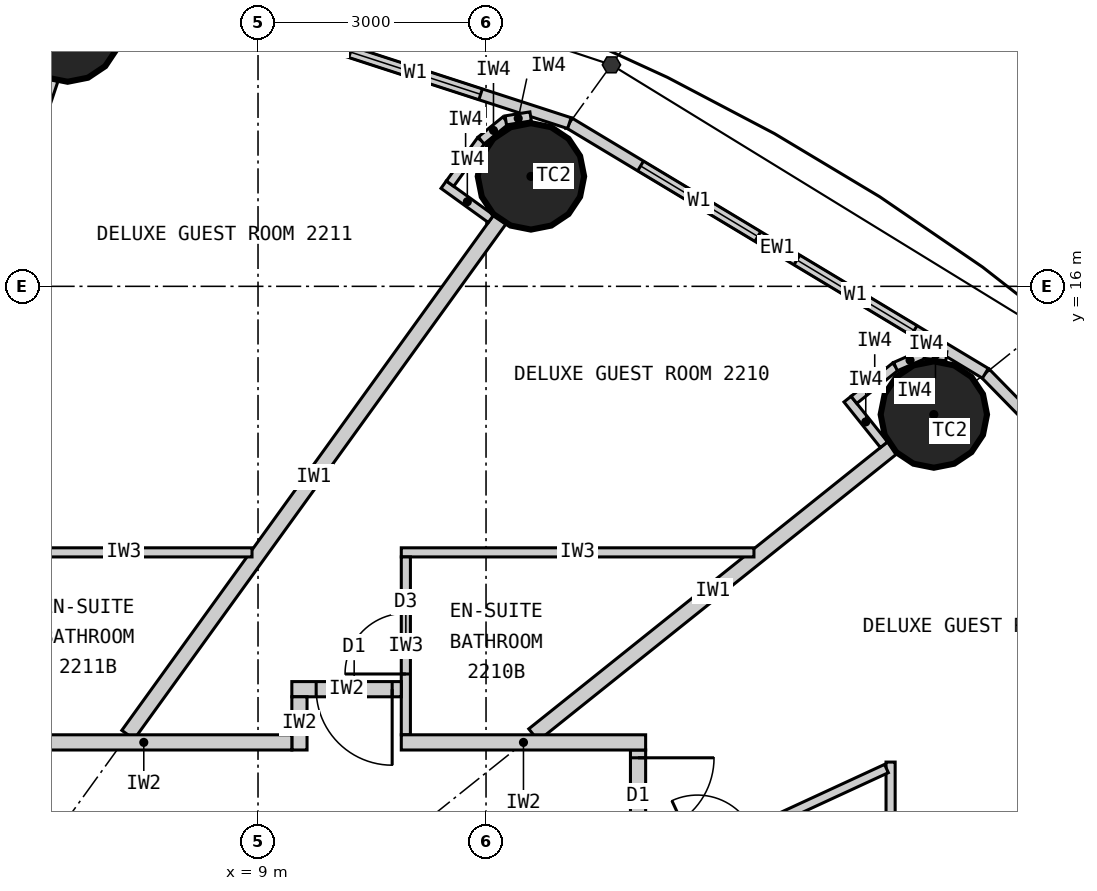
"""IFC4 building model, lengths in metres.
Left out: names, types, materials, properties, quantities, classifications, styles, units other than length and angle.
Written with IfcOpenShell. Run it as: python <this file> out.ifc"""

import sys

from ifc_helpers import new_model, si_unit, direction, frame, frame_2d, origin, origin_2d, place, context, subcontext, project, spatial, rectangle, circle, extrude, element, fill, save


model = new_model("IFC4")
c1 = context("Model", 3, precision=1e-05, world=origin(), true_north=direction((0.0, 1.0)))
c2 = subcontext(c1, "Body", "Model", "MODEL_VIEW")
j1 = project(units=[si_unit("LENGTHUNIT", "METRE"), si_unit("PLANEANGLEUNIT", "RADIAN")], contexts=[c1])
p1 = place(None, origin())
s1 = spatial("IfcSite", under=j1, at=p1, CompositionType="ELEMENT")
p2 = place(p1, origin())
s2 = spatial("IfcBuilding", under=s1, at=p2, CompositionType="ELEMENT")
p3 = place(p2, frame((0.0, 0.0, 87.0)))
s3 = spatial("IfcBuildingStorey", under=s2, at=p3, CompositionType="ELEMENT", Elevation=87.0)
for number, where, z_axis, x_axis in (
    (1, (17.892, 14.313, 0.0), (0.0, 0.0, 1.0), (1.0, 0.0, 0.0)),
    (2, (12.591, 17.447, 0.0), (0.0, 0.0, 1.0), (1.0, 0.0, 0.0)),
    (3, (6.495, 19.391, 0.0), (0.0, 0.0, 1.0), (1.0, 0.0, 0.0)),
):
    element("IfcColumn", number, at=place(p3, frame(where, z_axis=z_axis, x_axis=x_axis)), inside=s3, PredefinedType="COLUMN", context=c2, shape_type="SweptSolid", body=[
        extrude(circle(Radius=0.7, at=origin_2d()), origin(), (0.0, 0.0, 1.0), 3.3),
    ])
p4 = place(p3, frame((22.803, 10.532, 0.0), z_axis=(0.0, 0.0, 1.0), x_axis=(-0.699602905915, 0.714531856557, 0.0)))
e4 = element("IfcWall", 4, at=p4, inside=s3, PredefinedType="ELEMENTEDWALL", context=c2, shape_type="SweptSolid", body=[
    extrude(rectangle(XDim=6.051, YDim=0.15, at=frame_2d((3.025, 0.0))), origin(), (0.0, 0.0, 1.0), 3.12),
])
p5 = place(p4, frame((0.926, 0.0, 0.9)))
e5 = element("IfcOpeningElement", 5, at=p5, cuts=e4, PredefinedType="OPENING", context=c2, shape_type="SweptSolid", body=[
    extrude(rectangle(XDim=1.8, YDim=1.9, at=frame_2d((0.9, 0.95))), frame((0.0, 0.085, 0.0), z_axis=(0.0, -1.0, 0.0), x_axis=(1.0, 0.0, 0.0)), (0.0, 0.0, 1.0), 0.17),
])
p6 = place(p4, frame((3.325, 0.0, 0.9)))
e6 = element("IfcOpeningElement", 6, at=p6, cuts=e4, PredefinedType="OPENING", context=c2, shape_type="SweptSolid", body=[
    extrude(rectangle(XDim=1.8, YDim=1.9, at=frame_2d((0.9, 0.95))), frame((0.0, 0.085, 0.0), z_axis=(0.0, -1.0, 0.0), x_axis=(1.0, 0.0, 0.0)), (0.0, 0.0, 1.0), 0.17),
])
p7 = place(p3, frame((18.57, 14.856, 0.0), z_axis=(0.0, 0.0, 1.0), x_axis=(-0.856983180864, 0.515344377787, 0.0)))
e7 = element("IfcWall", 7, at=p7, inside=s3, PredefinedType="ELEMENTEDWALL", context=c2, shape_type="SweptSolid", body=[
    extrude(rectangle(XDim=6.386, YDim=0.15, at=frame_2d((3.193, 0.0))), origin(), (0.0, 0.0, 1.0), 3.12),
])
p8 = place(p7, frame((1.093, 0.0, 0.9)))
e8 = element("IfcOpeningElement", 8, at=p8, cuts=e7, PredefinedType="OPENING", context=c2, shape_type="SweptSolid", body=[
    extrude(rectangle(XDim=1.8, YDim=1.9, at=frame_2d((0.9, 0.95))), frame((0.0, 0.085, 0.0), z_axis=(0.0, -1.0, 0.0), x_axis=(1.0, 0.0, 0.0)), (0.0, 0.0, 1.0), 0.17),
])
p9 = place(p7, frame((3.493, 0.0, 0.9)))
e9 = element("IfcOpeningElement", 9, at=p9, cuts=e7, PredefinedType="OPENING", context=c2, shape_type="SweptSolid", body=[
    extrude(rectangle(XDim=1.8, YDim=1.9, at=frame_2d((0.9, 0.95))), frame((0.0, 0.085, 0.0), z_axis=(0.0, -1.0, 0.0), x_axis=(1.0, 0.0, 0.0)), (0.0, 0.0, 1.0), 0.17),
])
p10 = place(p3, frame((13.096, 18.147, 0.0), z_axis=(0.0, 0.0, 1.0), x_axis=(-0.951137534625, 0.308767534285, 0.0)))
e10 = element("IfcWall", 10, at=p10, inside=s3, PredefinedType="ELEMENTEDWALL", context=c2, shape_type="SweptSolid", body=[
    extrude(rectangle(XDim=6.655, YDim=0.15, at=frame_2d((3.328, 0.0))), origin(), (0.0, 0.0, 1.0), 3.12),
])
p11 = place(p10, frame((1.228, 0.0, 0.9)))
e11 = element("IfcOpeningElement", 11, at=p11, cuts=e10, PredefinedType="OPENING", context=c2, shape_type="SweptSolid", body=[
    extrude(rectangle(XDim=1.8, YDim=1.9, at=frame_2d((0.9, 0.95))), frame((0.0, 0.085, 0.0), z_axis=(0.0, -1.0, 0.0), x_axis=(1.0, 0.0, 0.0)), (0.0, 0.0, 1.0), 0.17),
])
p12 = place(p10, frame((3.628, 0.0, 0.9)))
e12 = element("IfcOpeningElement", 12, at=p12, cuts=e10, PredefinedType="OPENING", context=c2, shape_type="SweptSolid", body=[
    extrude(rectangle(XDim=1.8, YDim=1.9, at=frame_2d((0.9, 0.95))), frame((0.0, 0.085, 0.0), z_axis=(0.0, -1.0, 0.0), x_axis=(1.0, 0.0, 0.0)), (0.0, 0.0, 1.0), 0.17),
])
p13 = place(p3, frame((14.0, -9.9, 0.0), z_axis=(0.0, 0.0, 1.0), x_axis=(0.0, 1.0, 0.0)))
e13 = element("IfcWall", 13, at=p13, inside=s3, PredefinedType="PARTITIONING", context=c2, shape_type="SweptSolid", body=[
    extrude(rectangle(XDim=19.8, YDim=0.2, at=frame_2d((9.9, 0.0))), origin(), (0.0, 0.0, 1.0), 3.12),
])
p14 = place(p13, frame((0.204, 0.0, 0.0)))
e14 = element("IfcOpeningElement", 14, at=p14, cuts=e13, PredefinedType="OPENING", context=c2, shape_type="SweptSolid", body=[
    extrude(rectangle(XDim=1.0, YDim=2.2, at=frame_2d((0.5, 1.1))), frame((0.0, 0.11, 0.0), z_axis=(0.0, -1.0, 0.0), x_axis=(1.0, 0.0, 0.0)), (0.0, 0.0, 1.0), 0.22),
])
p15 = place(p13, frame((13.715, 0.0, 0.0)))
e15 = element("IfcOpeningElement", 15, at=p15, cuts=e13, PredefinedType="OPENING", context=c2, shape_type="SweptSolid", body=[
    extrude(rectangle(XDim=1.0, YDim=2.2, at=frame_2d((0.5, 1.1))), frame((0.0, 0.11, 0.0), z_axis=(0.0, -1.0, 0.0), x_axis=(1.0, 0.0, 0.0)), (0.0, 0.0, 1.0), 0.22),
])
p16 = place(p13, frame((18.698, 0.0, 0.0)))
e16 = element("IfcOpeningElement", 16, at=p16, cuts=e13, PredefinedType="OPENING", context=c2, shape_type="SweptSolid", body=[
    extrude(rectangle(XDim=1.0, YDim=2.2, at=frame_2d((0.5, 1.1))), frame((0.0, 0.11, 0.0), z_axis=(0.0, -1.0, 0.0), x_axis=(1.0, 0.0, 0.0)), (0.0, 0.0, 1.0), 0.22),
])
p17 = place(p3, frame((14.1, 6.512, 0.0), z_axis=(0.0, 0.0, 1.0), x_axis=(0.907832871056, 0.419332181247, 0.0)))
e17 = element("IfcWall", 17, at=p17, inside=s3, PredefinedType="PARTITIONING", context=c2, shape_type="SweptSolid", body=[
    extrude(rectangle(XDim=8.023, YDim=0.2, at=frame_2d((4.011, 0.0))), origin(), (0.0, 0.0, 1.0), 2.22),
])
p18 = place(p3, frame((12.625, 10.1, 0.0), z_axis=(0.0, 0.0, 1.0), x_axis=(0.780892451574, 0.624665493744, 0.0)))
e18 = element("IfcWall", 18, at=p18, inside=s3, PredefinedType="PARTITIONING", context=c2, shape_type="SweptSolid", body=[
    extrude(rectangle(XDim=6.045, YDim=0.2, at=frame_2d((3.022, 0.0))), origin(), (0.0, 0.0, 1.0), 2.27),
])
p19 = place(p3, frame((7.289, 10.1, 0.0), z_axis=(0.0, 0.0, 1.0), x_axis=(0.585198353053, 0.810890182197, 0.0)))
e19 = element("IfcWall", 19, at=p19, inside=s3, PredefinedType="PARTITIONING", context=c2, shape_type="SweptSolid", body=[
    extrude(rectangle(XDim=8.36, YDim=0.2, at=frame_2d((4.18, 0.0))), origin(), (0.0, 0.0, 1.0), 2.27),
])
p20 = place(p3, frame((3.383, 10.1, 0.0), z_axis=(0.0, 0.0, 1.0), x_axis=(0.31759592231, 0.948226149256, 0.0)))
e20 = element("IfcWall", 20, at=p20, inside=s3, PredefinedType="PARTITIONING", context=c2, shape_type="SweptSolid", body=[
    extrude(rectangle(XDim=9.098, YDim=0.2, at=frame_2d((4.549, 0.0))), origin(), (0.0, 0.0, 1.0), 2.27),
])
p21 = place(p3, frame((17.323, 8.101, 0.0), z_axis=(0.0, 0.0, 1.0), x_axis=(0.0, 1.0, 0.0)))
e21 = element("IfcWall", 21, at=p21, inside=s3, PredefinedType="PARTITIONING", context=c2, shape_type="SweptSolid", body=[
    extrude(rectangle(XDim=1.64, YDim=0.12, at=frame_2d((0.82, 0.0))), origin(), (0.0, 0.0, 1.0), 3.12),
])
p22 = place(p3, frame((14.1, 8.193, 0.0), z_axis=(0.0, 0.0, 1.0), x_axis=(0.907836493557, 0.419324338628, 0.0)))
e22 = element("IfcWall", 22, at=p22, inside=s3, PredefinedType="PARTITIONING", context=c2, shape_type="SweptSolid", body=[
    extrude(rectangle(XDim=3.49, YDim=0.12, at=frame_2d((1.745, 0.0))), origin(), (0.0, 0.0, 1.0), 3.12),
])
p23 = place(p22, frame((0.75, 0.0, 0.0)))
e23 = element("IfcOpeningElement", 23, at=p23, cuts=e22, PredefinedType="OPENING", context=c2, shape_type="SweptSolid", body=[
    extrude(rectangle(XDim=0.8, YDim=2.1, at=frame_2d((0.4, 1.05))), frame((0.0, 0.07, 0.0), z_axis=(0.0, -1.0, 0.0), x_axis=(1.0, 0.0, 0.0)), (0.0, 0.0, 1.0), 0.14),
])
p24 = place(p3, frame((15.525, 12.5, 0.0), z_axis=(0.0, 0.0, 1.0), x_axis=(-1.0, 0.0, 0.0)))
e24 = element("IfcWall", 24, at=p24, inside=s3, PredefinedType="PARTITIONING", context=c2, shape_type="SweptSolid", body=[
    extrude(rectangle(XDim=4.64, YDim=0.12, at=frame_2d((2.32, 0.0))), origin(), (0.0, 0.0, 1.0), 3.12),
])
p25 = place(p3, frame((10.945, 10.1, 0.0), z_axis=(0.0, 0.0, 1.0), x_axis=(0.0, 1.0, 0.0)))
e25 = element("IfcWall", 25, at=p25, inside=s3, PredefinedType="PARTITIONING", context=c2, shape_type="SweptSolid", body=[
    extrude(rectangle(XDim=2.34, YDim=0.12, at=frame_2d((1.17, 0.0))), origin(), (0.0, 0.0, 1.0), 3.12),
])
p26 = place(p25, frame((0.8, 0.0, 0.0)))
e26 = element("IfcOpeningElement", 26, at=p26, cuts=e25, PredefinedType="OPENING", context=c2, shape_type="SweptSolid", body=[
    extrude(rectangle(XDim=0.8, YDim=2.1, at=frame_2d((0.4, 1.05))), frame((0.0, 0.07, 0.0), z_axis=(0.0, -1.0, 0.0), x_axis=(1.0, 0.0, 0.0)), (0.0, 0.0, 1.0), 0.14),
])
p27 = place(p3, frame((8.921, 12.5, 0.0), z_axis=(0.0, 0.0, 1.0), x_axis=(-1.0, 0.0, 0.0)))
e27 = element("IfcWall", 27, at=p27, inside=s3, PredefinedType="PARTITIONING", context=c2, shape_type="SweptSolid", body=[
    extrude(rectangle(XDim=3.372, YDim=0.12, at=frame_2d((1.686, 0.0))), origin(), (0.0, 0.0, 1.0), 3.12),
])
p28 = place(p3, frame((9.445, 10.7, 0.0), z_axis=(0.0, 0.0, 1.0), x_axis=(1.0, 0.0, 0.0)))
e28 = element("IfcWall", 28, at=p28, inside=s3, PredefinedType="PARTITIONING", context=c2, shape_type="SweptSolid", body=[
    extrude(rectangle(XDim=1.44, YDim=0.2, at=frame_2d((0.72, 0.0))), origin(), (0.0, 0.0, 1.0), 3.12),
])
p29 = place(p28, frame((0.32, 0.0, 0.0)))
e29 = element("IfcOpeningElement", 29, at=p29, cuts=e28, PredefinedType="OPENING", context=c2, shape_type="SweptSolid", body=[
    extrude(rectangle(XDim=1.0, YDim=2.2, at=frame_2d((0.5, 1.1))), frame((0.0, 0.11, 0.0), z_axis=(0.0, -1.0, 0.0), x_axis=(1.0, 0.0, 0.0)), (0.0, 0.0, 1.0), 0.22),
])
p30 = place(p3, frame((9.545, 9.9, 0.0), z_axis=(0.0, 0.0, 1.0), x_axis=(0.0, 1.0, 0.0)))
e30 = element("IfcWall", 30, at=p30, inside=s3, PredefinedType="PARTITIONING", context=c2, shape_type="SweptSolid", body=[
    extrude(rectangle(XDim=0.7, YDim=0.2, at=frame_2d((0.35, 0.0))), origin(), (0.0, 0.0, 1.0), 3.12),
])
p31 = place(p3, frame((5.549, 10.0, 0.0), z_axis=(0.0, 0.0, 1.0), x_axis=(1.0, 0.0, 0.0)))
e31 = element("IfcWall", 31, at=p31, inside=s3, PredefinedType="PARTITIONING", context=c2, shape_type="SweptSolid", body=[
    extrude(rectangle(XDim=3.896, YDim=0.2, at=frame_2d((1.948, 0.0))), origin(), (0.0, 0.0, 1.0), 3.12),
])
p32 = place(p3, frame((10.885, 10.0, 0.0), z_axis=(0.0, 0.0, 1.0), x_axis=(1.0, 0.0, 0.0)))
e32 = element("IfcWall", 32, at=p32, inside=s3, PredefinedType="PARTITIONING", context=c2, shape_type="SweptSolid", body=[
    extrude(rectangle(XDim=3.215, YDim=0.2, at=frame_2d((1.607, 0.0))), origin(), (0.0, 0.0, 1.0), 3.12),
])
p33 = place(p3, frame((17.236, 13.917, 0.0), z_axis=(0.0, 0.0, 1.0), x_axis=(-0.624695047554, 0.780868809443, 0.0)))
e33 = element("IfcWall", 33, at=p33, inside=s3, PredefinedType="PARTITIONING", context=c2, shape_type="SweptSolid", body=[
    extrude(rectangle(XDim=0.768, YDim=0.12, at=frame_2d((0.384, 0.0))), origin(), (0.0, 0.0, 1.0), 3.12),
])
p34 = place(p3, frame((16.841, 14.507, 0.0), z_axis=(0.0, 0.0, 1.0), x_axis=(0.780902834923, 0.62465251333, 0.0)))
e34 = element("IfcWall", 34, at=p34, inside=s3, PredefinedType="PARTITIONING", context=c2, shape_type="SweptSolid", body=[
    extrude(rectangle(XDim=0.7, YDim=0.12, at=frame_2d((0.35, 0.0))), origin(), (0.0, 0.0, 1.0), 3.12),
])
p35 = place(p3, frame((17.387, 14.944, 0.0), z_axis=(0.0, 0.0, 1.0), x_axis=(0.916036698064, 0.401094462441, 0.0)))
e35 = element("IfcWall", 35, at=p35, inside=s3, PredefinedType="PARTITIONING", context=c2, shape_type="SweptSolid", body=[
    extrude(rectangle(XDim=0.418, YDim=0.12, at=frame_2d((0.209, 0.0))), origin(), (0.0, 0.0, 1.0), 3.12),
])
p36 = place(p3, frame((17.77, 15.112, 0.0), z_axis=(0.0, 0.0, 1.0), x_axis=(0.993904401174, -0.110245368731, 0.0)))
e36 = element("IfcWall", 36, at=p36, inside=s3, PredefinedType="PARTITIONING", context=c2, shape_type="SweptSolid", body=[
    extrude(rectangle(XDim=0.288, YDim=0.12, at=frame_2d((0.144, 0.0))), origin(), (0.0, 0.0, 1.0), 3.12),
])
p37 = place(p3, frame((12.065, 16.889, 0.0), z_axis=(0.0, 0.0, 1.0), x_axis=(-0.810821798253, 0.585293098778, 0.0)))
e37 = element("IfcWall", 37, at=p37, inside=s3, PredefinedType="PARTITIONING", context=c2, shape_type="SweptSolid", body=[
    extrude(rectangle(XDim=0.768, YDim=0.12, at=frame_2d((0.384, 0.0))), origin(), (0.0, 0.0, 1.0), 3.12),
])
p38 = place(p3, frame((11.526, 17.351, 0.0), z_axis=(0.0, 0.0, 1.0), x_axis=(0.585223113993, 0.810872312296, 0.0)))
e38 = element("IfcWall", 38, at=p38, inside=s3, PredefinedType="PARTITIONING", context=c2, shape_type="SweptSolid", body=[
    extrude(rectangle(XDim=0.7, YDim=0.12, at=frame_2d((0.35, 0.0))), origin(), (0.0, 0.0, 1.0), 3.12),
])
p39 = place(p3, frame((11.936, 17.919, 0.0), z_axis=(0.0, 0.0, 1.0), x_axis=(0.775023088441, 0.631932917629, 0.0)))
e39 = element("IfcWall", 39, at=p39, inside=s3, PredefinedType="PARTITIONING", context=c2, shape_type="SweptSolid", body=[
    extrude(rectangle(XDim=0.418, YDim=0.12, at=frame_2d((0.209, 0.0))), origin(), (0.0, 0.0, 1.0), 3.12),
])
p40 = place(p3, frame((12.26, 18.183, 0.0), z_axis=(0.0, 0.0, 1.0), x_axis=(0.987218661664, 0.159371622511, 0.0)))
e40 = element("IfcWall", 40, at=p40, inside=s3, PredefinedType="PARTITIONING", context=c2, shape_type="SweptSolid", body=[
    extrude(rectangle(XDim=0.331, YDim=0.12, at=frame_2d((0.166, 0.0))), origin(), (0.0, 0.0, 1.0), 3.12),
])
p41 = place(p8, origin())
e41 = element("IfcWindow", 41, at=p41, inside=s3, PartitioningType="SINGLE_PANEL", PredefinedType="WINDOW", context=c2, shape_type="SweptSolid", body=[
    extrude(rectangle(XDim=1.8, YDim=1.9, at=frame_2d((0.9, 0.95))), frame((0.0, 0.03, 0.0), z_axis=(0.0, -1.0, 0.0), x_axis=(1.0, 0.0, 0.0)), (0.0, 0.0, 1.0), 0.06),
])
fill(e8, e41)
p42 = place(p9, origin())
e42 = element("IfcWindow", 42, at=p42, inside=s3, PartitioningType="SINGLE_PANEL", PredefinedType="WINDOW", context=c2, shape_type="SweptSolid", body=[
    extrude(rectangle(XDim=1.8, YDim=1.9, at=frame_2d((0.9, 0.95))), frame((0.0, 0.03, 0.0), z_axis=(0.0, -1.0, 0.0), x_axis=(1.0, 0.0, 0.0)), (0.0, 0.0, 1.0), 0.06),
])
fill(e9, e42)
p43 = place(p11, origin())
e43 = element("IfcWindow", 43, at=p43, inside=s3, PartitioningType="SINGLE_PANEL", PredefinedType="WINDOW", context=c2, shape_type="SweptSolid", body=[
    extrude(rectangle(XDim=1.8, YDim=1.9, at=frame_2d((0.9, 0.95))), frame((0.0, 0.03, 0.0), z_axis=(0.0, -1.0, 0.0), x_axis=(1.0, 0.0, 0.0)), (0.0, 0.0, 1.0), 0.06),
])
fill(e11, e43)
p44 = place(p16, origin())
e44 = element("IfcDoor", 44, at=p44, inside=s3, OperationType="SINGLE_SWING_RIGHT", PredefinedType="DOOR", context=c2, shape_type="SweptSolid", body=[
    extrude(rectangle(XDim=1.0, YDim=2.2, at=frame_2d((0.5, 1.1))), frame((0.0, 0.025, 0.0), z_axis=(0.0, -1.0, 0.0), x_axis=(1.0, 0.0, 0.0)), (0.0, 0.0, 1.0), 0.05),
])
fill(e16, e44)
p45 = place(p26, origin())
e45 = element("IfcDoor", 45, at=p45, inside=s3, OperationType="SINGLE_SWING_LEFT", PredefinedType="DOOR", context=c2, shape_type="SweptSolid", body=[
    extrude(rectangle(XDim=0.8, YDim=2.1, at=frame_2d((0.4, 1.05))), frame((0.0, 0.025, 0.0), z_axis=(0.0, -1.0, 0.0), x_axis=(1.0, 0.0, 0.0)), (0.0, 0.0, 1.0), 0.05),
])
fill(e26, e45)
p46 = place(p29, origin())
e46 = element("IfcDoor", 46, at=p46, inside=s3, OperationType="SINGLE_SWING_RIGHT", PredefinedType="DOOR", context=c2, shape_type="SweptSolid", body=[
    extrude(rectangle(XDim=1.0, YDim=2.2, at=frame_2d((0.5, 1.1))), frame((0.0, 0.025, 0.0), z_axis=(0.0, -1.0, 0.0), x_axis=(1.0, 0.0, 0.0)), (0.0, 0.0, 1.0), 0.05),
])
fill(e29, e46)
save(model, sys.argv[1])
